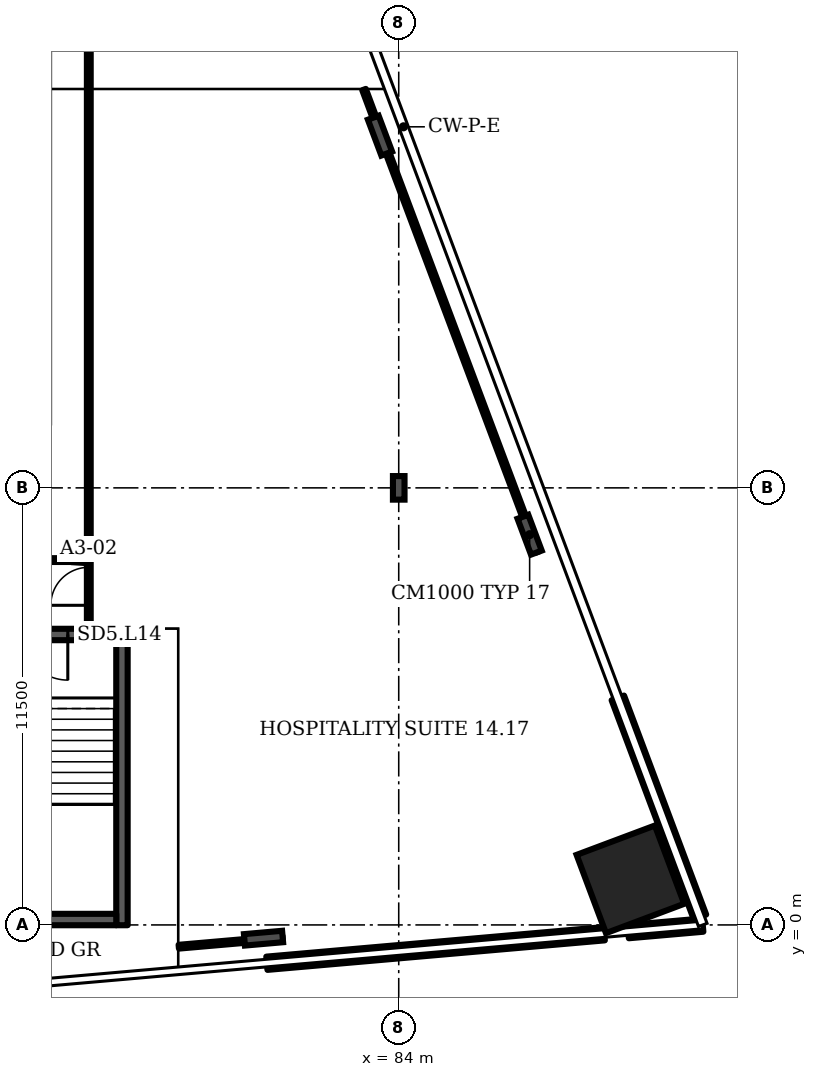
"""IFC4 building model, lengths in metres.
Left out: names, types, materials, properties, quantities, classifications, styles, units other than length and angle.
Written with IfcOpenShell. Run it as: python <this file> out.ifc"""

import sys

from ifc_helpers import new_model, si_unit, direction, frame, frame_2d, origin, origin_2d, place, context, subcontext, project, spatial, rectangle, i_section, extrude, element, fill, save


model = new_model("IFC4")
c1 = context("Model", 3, precision=1e-05, world=origin(), true_north=direction((0.0, 1.0)))
c2 = subcontext(c1, "Body", "Model", "MODEL_VIEW")
j1 = project(units=[si_unit("LENGTHUNIT", "METRE"), si_unit("PLANEANGLEUNIT", "RADIAN")], contexts=[c1])
p1 = place(None, origin())
s1 = spatial("IfcSite", under=j1, at=p1, CompositionType="ELEMENT")
p2 = place(p1, origin())
s2 = spatial("IfcBuilding", under=s1, at=p2, CompositionType="ELEMENT")
p3 = place(p2, frame((0.0, 0.0, 70.3)))
s3 = spatial("IfcBuildingStorey", under=s2, at=p3, CompositionType="ELEMENT", Elevation=70.3)
p4 = place(p3, frame((90.096, 1.2, 0.0), z_axis=(0.0, 0.0, 1.0), x_axis=(-0.351123, 0.936328, 0.0)))
e1 = element("IfcColumn", 1, at=p4, inside=s3, PredefinedType="COLUMN", context=c2, shape_type="SweptSolid", body=[
    extrude(rectangle(XDim=2.2, YDim=2.2, at=origin_2d()), origin(), (0.0, 0.0, 1.0), 3.6),
])
for number, where, z_axis, x_axis in (
    (2, (80.442, -0.349, 0.0), (0.0, 0.0, 1.0), (0.087, -0.996, 0.0)),
    (3, (87.445, 10.268, 0.0), (0.0, 0.0, 1.0), (0.936, 0.351, 0.0)),
    (4, (83.507, 20.768, 0.0), (0.0, 0.0, 1.0), (0.936, 0.351, 0.0)),
):
    element("IfcColumn", number, at=place(p3, frame(where, z_axis=z_axis, x_axis=x_axis)), inside=s3, PredefinedType="COLUMN", context=c2, shape_type="SweptSolid", body=[
        extrude(i_section(OverallWidth=0.302, OverallDepth=1.008, WebThickness=0.021, FlangeThickness=0.04, FilletRadius=0.03, at=origin_2d()), origin(), (0.0, 0.0, 1.0), 3.6),
    ])
p5 = place(p3, frame((84.0, 11.5, 0.0), z_axis=(0.0, 0.0, 1.0), x_axis=(1.0, 0.0, 0.0)))
e5 = element("IfcColumn", 5, at=p5, inside=s3, PredefinedType="COLUMN", context=c2, shape_type="SweptSolid", body=[
    extrude(i_section(OverallWidth=0.305, OverallDepth=0.62, WebThickness=0.021, FlangeThickness=0.04, FilletRadius=0.027, at=origin_2d()), origin(), (0.0, 0.0, 1.0), 3.6),
])
p6 = place(p3, frame((80.53, -1.009, 0.0), z_axis=(0.0, 0.0, 1.0), x_axis=(0.996198, 0.087169, 0.0)))
e6 = element("IfcWall", 6, at=p6, inside=s3, PredefinedType="SOLIDWALL", context=c2, shape_type="SweptSolid", body=[
    extrude(rectangle(XDim=8.912, YDim=0.35, at=frame_2d((4.456, 0.0))), origin(), (0.0, 0.0, 1.0), 1.0),
])
p7 = place(p3, frame((90.039, -0.177, 0.0), z_axis=(0.0, 0.0, 1.0), x_axis=(0.996193, 0.08717, 0.0)))
e7 = element("IfcWall", 7, at=p7, inside=s3, PredefinedType="SOLIDWALL", context=c2, shape_type="SweptSolid", body=[
    extrude(rectangle(XDim=1.969, YDim=0.35, at=frame_2d((0.984, 0.0))), origin(), (0.0, 0.0, 1.0), 1.0),
])
p8 = place(p3, frame((91.926, 0.211, 0.0), z_axis=(0.0, 0.0, 1.0), x_axis=(-0.351118, 0.936328, 0.0)))
e8 = element("IfcWall", 8, at=p8, inside=s3, PredefinedType="SOLIDWALL", context=c2, shape_type="SweptSolid", body=[
    extrude(rectangle(XDim=6.154, YDim=0.35, at=frame_2d((3.077, 0.0))), origin(), (0.0, 0.0, 1.0), 1.0),
])
p9 = place(p3, frame((72.518, 7.642, 0.0), z_axis=(0.0, 0.0, 1.0), x_axis=(1.0, 0.0, 0.0)))
e9 = element("IfcWall", 9, at=p9, inside=s3, PredefinedType="SHEAR", context=c2, shape_type="SweptSolid", body=[
    extrude(rectangle(XDim=4.35, YDim=0.3, at=frame_2d((2.175, 0.0))), origin(), (0.0, 0.0, 1.0), 3.2),
])
p10 = place(p9, frame((1.575, 0.0, 0.0)))
e10 = element("IfcOpeningElement", 10, at=p10, cuts=e9, PredefinedType="OPENING", context=c2, shape_type="SweptSolid", body=[
    extrude(rectangle(XDim=1.2, YDim=2.1, at=frame_2d((0.6, 1.05))), frame((0.0, 0.16, 0.0), z_axis=(0.0, -1.0, 0.0), x_axis=(1.0, 0.0, 0.0)), (0.0, 0.0, 1.0), 0.32),
])
p11 = place(p3, frame((65.91, 9.6, 0.0), z_axis=(0.0, 0.0, 1.0), x_axis=(1.0, 0.0, 0.0)))
e11 = element("IfcWall", 11, at=p11, inside=s3, PredefinedType="PARTITIONING", context=c2, shape_type="SweptSolid", body=[
    extrude(rectangle(XDim=9.485, YDim=0.1, at=frame_2d((4.743, 0.0))), origin(), (0.0, 0.0, 1.0), 3.2),
])
p12 = place(p3, frame((75.43, 10.045, 0.0), z_axis=(0.0, 0.0, 1.0), x_axis=(1.0, 0.0, 0.0)))
e12 = element("IfcWall", 12, at=p12, inside=s3, PredefinedType="PARTITIONING", context=c2, shape_type="SweptSolid", body=[
    extrude(rectangle(XDim=0.16, YDim=0.1, at=frame_2d((0.08, 0.0))), origin(), (0.0, 0.0, 1.0), 3.2),
])
p13 = place(p3, frame((75.725, 9.575, 0.0), z_axis=(0.0, 0.0, 1.0), x_axis=(-0.99817, 0.06054, 0.0)))
e13 = element("IfcWall", 13, at=p13, inside=s3, PredefinedType="PARTITIONING", context=c2, shape_type="SweptSolid", body=[
    extrude(rectangle(XDim=0.331, YDim=0.1, at=frame_2d((0.165, 0.0))), origin(), (0.0, 0.0, 1.0), 3.2),
])
p14 = place(p3, frame((75.725, 9.575, 0.0), z_axis=(0.0, 0.0, 1.0), x_axis=(0.0, 1.0, 0.0)))
e14 = element("IfcWall", 14, at=p14, inside=s3, PredefinedType="PARTITIONING", context=c2, shape_type="SweptSolid", body=[
    extrude(rectangle(XDim=0.45, YDim=0.1, at=frame_2d((0.225, 0.0))), origin(), (0.0, 0.0, 1.0), 3.2),
])
p15 = place(p3, frame((75.845, 7.812, 0.0), z_axis=(0.0, 0.0, 1.0), x_axis=(0.0, 1.0, 0.0)))
e15 = element("IfcWall", 15, at=p15, inside=s3, PredefinedType="PARTITIONING", context=c2, shape_type="SweptSolid", body=[
    extrude(rectangle(XDim=15.513, YDim=0.1, at=frame_2d((7.756, 0.0))), origin(), (0.0, 0.0, 1.0), 3.2),
])
p16 = place(p15, frame((0.598, 0.0, 0.0)))
e16 = element("IfcOpeningElement", 16, at=p16, cuts=e15, PredefinedType="OPENING", context=c2, shape_type="SweptSolid", body=[
    extrude(rectangle(XDim=1.0, YDim=2.1, at=frame_2d((0.5, 1.05))), frame((0.0, 0.06, 0.0), z_axis=(0.0, -1.0, 0.0), x_axis=(1.0, 0.0, 0.0)), (0.0, 0.0, 1.0), 0.12),
])
p17 = place(p3, frame((78.212, -0.573, 0.0), z_axis=(0.0, 0.0, 1.0), x_axis=(0.996224, 0.086779, 0.0)))
e17 = element("IfcWall", 17, at=p17, inside=s3, PredefinedType="PARTITIONING", context=c2, shape_type="SweptSolid", body=[
    extrude(rectangle(XDim=2.743, YDim=0.1, at=frame_2d((1.372, 0.0))), origin(), (0.0, 0.0, 1.0), 2.58),
])
p18 = place(p3, frame((83.71, 20.31, 0.0), z_axis=(0.0, 0.0, 1.0), x_axis=(-0.349322, 0.937005, 0.0)))
e18 = element("IfcWall", 18, at=p18, inside=s3, PredefinedType="PARTITIONING", context=c2, shape_type="SweptSolid", body=[
    extrude(rectangle(XDim=1.782, YDim=0.1, at=frame_2d((0.891, 0.0))), origin(), (0.0, 0.0, 1.0), 2.58),
])
p19 = place(p3, frame((87.65, 9.81, 0.0), z_axis=(0.0, 0.0, 1.0), x_axis=(-0.351395, 0.936227, 0.0)))
e19 = element("IfcWall", 19, at=p19, inside=s3, PredefinedType="PARTITIONING", context=c2, shape_type="SweptSolid", body=[
    extrude(rectangle(XDim=11.226, YDim=0.1, at=frame_2d((5.613, 0.0))), origin(), (0.0, 0.0, 1.0), 2.58),
])
p20 = place(p3, frame((76.718, -0.008, 0.0), z_axis=(0.0, 0.0, 1.0), x_axis=(0.0, 1.0, 0.0)))
e20 = element("IfcWall", 20, at=p20, inside=s3, PredefinedType="SHEAR", context=c2, shape_type="SweptSolid", body=[
    extrude(rectangle(XDim=7.5, YDim=0.3, at=frame_2d((3.75, 0.0))), origin(), (0.0, 0.0, 1.0), 3.2),
])
p21 = place(p3, frame((72.817, 0.142, 0.0), z_axis=(0.0, 0.0, 1.0), x_axis=(1.0, 0.0, 0.0)))
e21 = element("IfcWall", 21, at=p21, inside=s3, PredefinedType="SHEAR", context=c2, shape_type="SweptSolid", body=[
    extrude(rectangle(XDim=3.75, YDim=0.3, at=frame_2d((1.875, 0.0))), origin(), (0.0, 0.0, 1.0), 3.2),
])
p22 = place(p10, origin())
e22 = element("IfcDoor", 22, at=p22, inside=s3, OperationType="SINGLE_SWING_RIGHT", PredefinedType="DOOR", context=c2, shape_type="SweptSolid", body=[
    extrude(rectangle(XDim=1.2, YDim=2.1, at=frame_2d((0.6, 1.05))), frame((0.0, 0.025, 0.0), z_axis=(0.0, -1.0, 0.0), x_axis=(1.0, 0.0, 0.0)), (0.0, 0.0, 1.0), 0.05),
])
fill(e10, e22)
p23 = place(p16, origin())
e23 = element("IfcDoor", 23, at=p23, inside=s3, OperationType="SINGLE_SWING_LEFT", PredefinedType="DOOR", context=c2, shape_type="SweptSolid", body=[
    extrude(rectangle(XDim=1.0, YDim=2.1, at=frame_2d((0.5, 1.05))), frame((0.0, 0.025, 0.0), z_axis=(0.0, -1.0, 0.0), x_axis=(1.0, 0.0, 0.0)), (0.0, 0.0, 1.0), 0.05),
])
fill(e16, e23)
save(model, sys.argv[1])
